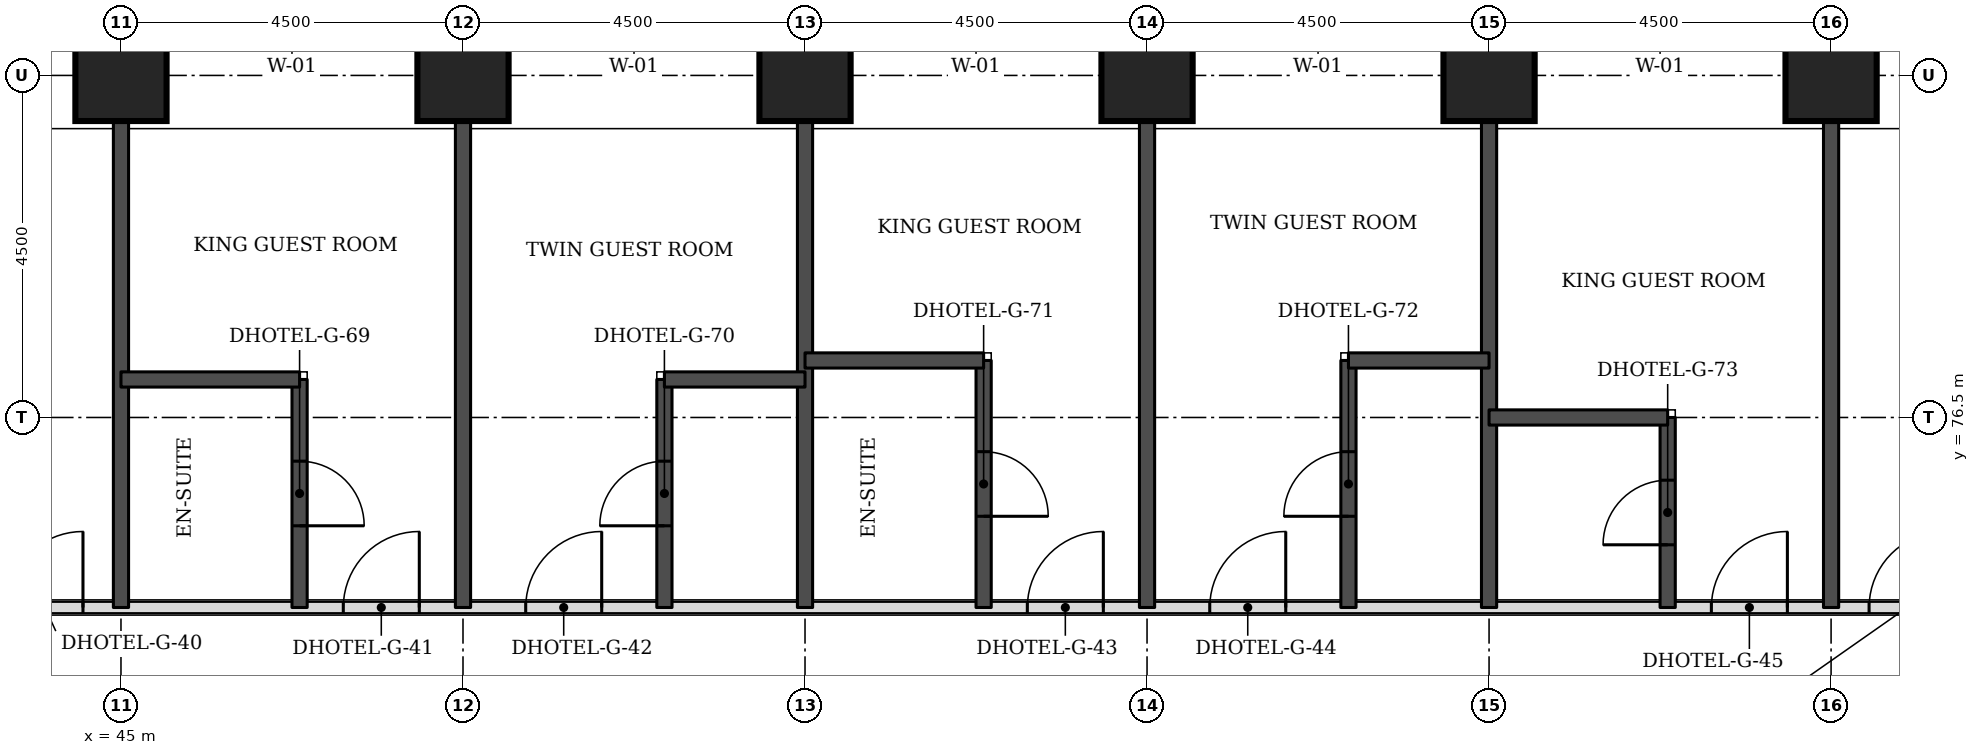
"""IFC4 building model, lengths in metres.
Left out: names, types, materials, properties, quantities, classifications, styles, units other than length and angle.
Written with IfcOpenShell. Run it as: python <this file> out.ifc"""

import sys

from ifc_helpers import new_model, si_unit, direction, frame, frame_2d, origin, origin_2d, place, context, subcontext, project, spatial, rectangle, extrude, element, fill, save


model = new_model("IFC4")
c1 = context("Model", 3, precision=1e-05, world=origin(), true_north=direction((0.0, 1.0)))
c2 = subcontext(c1, "Body", "Model", "MODEL_VIEW")
j1 = project(units=[si_unit("LENGTHUNIT", "METRE"), si_unit("PLANEANGLEUNIT", "RADIAN")], contexts=[c1])
p1 = place(None, origin())
s1 = spatial("IfcSite", under=j1, at=p1, CompositionType="ELEMENT")
p2 = place(p1, origin())
s2 = spatial("IfcBuilding", under=s1, at=p2, CompositionType="ELEMENT")
p3 = place(p2, frame((0.0, 0.0, 66.0)))
s3 = spatial("IfcBuildingStorey", under=s2, at=p3, CompositionType="ELEMENT", Elevation=66.0)
for number, where, z_axis, x_axis in (
    (1, (45.0, 81.0, 0.0), (0.0, 0.0, 1.0), (1.0, 0.0, 0.0)),
    (2, (49.5, 81.0, 0.0), (0.0, 0.0, 1.0), (1.0, 0.0, 0.0)),
    (3, (54.0, 81.0, 0.0), (0.0, 0.0, 1.0), (1.0, 0.0, 0.0)),
    (4, (58.5, 81.0, 0.0), (0.0, 0.0, 1.0), (1.0, 0.0, 0.0)),
    (5, (63.0, 81.0, 0.0), (0.0, 0.0, 1.0), (1.0, 0.0, 0.0)),
    (6, (67.5, 81.0, 0.0), (0.0, 0.0, 1.0), (1.0, 0.0, 0.0)),
):
    element("IfcColumn", number, at=place(p3, frame(where, z_axis=z_axis, x_axis=x_axis)), inside=s3, PredefinedType="COLUMN", context=c2, shape_type="SweptSolid", body=[
        extrude(rectangle(XDim=1.2, YDim=1.2, at=origin_2d()), origin(), (0.0, 0.0, 1.0), 3.3),
    ])
p4 = place(p3, frame((43.0, 74.0, 0.0), z_axis=(0.0, 0.0, 1.0), x_axis=(1.0, 0.0, 0.0)))
e7 = element("IfcWall", 7, at=p4, inside=s3, PredefinedType="PARTITIONING", context=c2, shape_type="SweptSolid", body=[
    extrude(rectangle(XDim=26.5, YDim=0.15, at=frame_2d((13.25, 0.0))), origin(), (0.0, 0.0, 1.0), 3.08),
])
p5 = place(p4, frame((4.925, 0.0, 0.0)))
e8 = element("IfcOpeningElement", 8, at=p5, cuts=e7, PredefinedType="OPENING", context=c2, shape_type="SweptSolid", body=[
    extrude(rectangle(XDim=1.0, YDim=2.1, at=frame_2d((0.5, 1.05))), frame((0.0, 0.085, 0.0), z_axis=(0.0, -1.0, 0.0), x_axis=(1.0, 0.0, 0.0)), (0.0, 0.0, 1.0), 0.17),
])
p6 = place(p4, frame((7.325, 0.0, 0.0)))
e9 = element("IfcOpeningElement", 9, at=p6, cuts=e7, PredefinedType="OPENING", context=c2, shape_type="SweptSolid", body=[
    extrude(rectangle(XDim=1.0, YDim=2.1, at=frame_2d((0.5, 1.05))), frame((0.0, 0.085, 0.0), z_axis=(0.0, -1.0, 0.0), x_axis=(1.0, 0.0, 0.0)), (0.0, 0.0, 1.0), 0.17),
])
p7 = place(p4, frame((13.925, 0.0, 0.0)))
e10 = element("IfcOpeningElement", 10, at=p7, cuts=e7, PredefinedType="OPENING", context=c2, shape_type="SweptSolid", body=[
    extrude(rectangle(XDim=1.0, YDim=2.1, at=frame_2d((0.5, 1.05))), frame((0.0, 0.085, 0.0), z_axis=(0.0, -1.0, 0.0), x_axis=(1.0, 0.0, 0.0)), (0.0, 0.0, 1.0), 0.17),
])
p8 = place(p4, frame((16.325, 0.0, 0.0)))
e11 = element("IfcOpeningElement", 11, at=p8, cuts=e7, PredefinedType="OPENING", context=c2, shape_type="SweptSolid", body=[
    extrude(rectangle(XDim=1.0, YDim=2.1, at=frame_2d((0.5, 1.05))), frame((0.0, 0.085, 0.0), z_axis=(0.0, -1.0, 0.0), x_axis=(1.0, 0.0, 0.0)), (0.0, 0.0, 1.0), 0.17),
])
p9 = place(p4, frame((22.925, 0.0, 0.0)))
e12 = element("IfcOpeningElement", 12, at=p9, cuts=e7, PredefinedType="OPENING", context=c2, shape_type="SweptSolid", body=[
    extrude(rectangle(XDim=1.0, YDim=2.1, at=frame_2d((0.5, 1.05))), frame((0.0, 0.085, 0.0), z_axis=(0.0, -1.0, 0.0), x_axis=(1.0, 0.0, 0.0)), (0.0, 0.0, 1.0), 0.17),
])
p10 = place(p4, frame((0.5, 0.0, 0.0)))
e13 = element("IfcOpeningElement", 13, at=p10, cuts=e7, PredefinedType="OPENING", context=c2, shape_type="SweptSolid", body=[
    extrude(rectangle(XDim=1.0, YDim=2.1, at=frame_2d((0.5, 1.05))), frame((0.0, 0.085, 0.0), z_axis=(0.0, -1.0, 0.0), x_axis=(1.0, 0.0, 0.0)), (0.0, 0.0, 1.0), 0.17),
])
p11 = place(p4, frame((25.0, 0.0, 0.0)))
e14 = element("IfcOpeningElement", 14, at=p11, cuts=e7, PredefinedType="OPENING", context=c2, shape_type="SweptSolid", body=[
    extrude(rectangle(XDim=1.0, YDim=2.1, at=frame_2d((0.5, 1.05))), frame((0.0, 0.085, 0.0), z_axis=(0.0, -1.0, 0.0), x_axis=(1.0, 0.0, 0.0)), (0.0, 0.0, 1.0), 0.17),
])
p12 = place(p3, frame((45.0, 74.0, 0.0), z_axis=(0.0, 0.0, 1.0), x_axis=(0.0, 1.0, 0.0)))
e15 = element("IfcWall", 15, at=p12, inside=s3, PredefinedType="SOLIDWALL", context=c2, shape_type="SweptSolid", body=[
    extrude(rectangle(XDim=6.4, YDim=0.2, at=frame_2d((3.2, 0.0))), origin(), (0.0, 0.0, 1.0), 3.08),
])
p13 = place(p3, frame((47.35, 74.0, 0.0), z_axis=(0.0, 0.0, 1.0), x_axis=(0.0, 1.0, 0.0)))
e16 = element("IfcWall", 16, at=p13, inside=s3, PredefinedType="SOLIDWALL", context=c2, shape_type="SweptSolid", body=[
    extrude(rectangle(XDim=3.0, YDim=0.2, at=frame_2d((1.5, 0.0))), origin(), (0.0, 0.0, 1.0), 3.08),
])
p14 = place(p13, frame((1.075, 0.0, 0.0)))
e17 = element("IfcOpeningElement", 17, at=p14, cuts=e16, PredefinedType="OPENING", context=c2, shape_type="SweptSolid", body=[
    extrude(rectangle(XDim=0.85, YDim=2.1, at=frame_2d((0.425, 1.05))), frame((0.0, 0.11, 0.0), z_axis=(0.0, -1.0, 0.0), x_axis=(1.0, 0.0, 0.0)), (0.0, 0.0, 1.0), 0.22),
])
p15 = place(p3, frame((49.5, 74.0, 0.0), z_axis=(0.0, 0.0, 1.0), x_axis=(0.0, 1.0, 0.0)))
e18 = element("IfcWall", 18, at=p15, inside=s3, PredefinedType="SOLIDWALL", context=c2, shape_type="SweptSolid", body=[
    extrude(rectangle(XDim=6.4, YDim=0.2, at=frame_2d((3.2, 0.0))), origin(), (0.0, 0.0, 1.0), 3.08),
])
p16 = place(p3, frame((52.15, 74.0, 0.0), z_axis=(0.0, 0.0, 1.0), x_axis=(0.0, 1.0, 0.0)))
e19 = element("IfcWall", 19, at=p16, inside=s3, PredefinedType="SOLIDWALL", context=c2, shape_type="SweptSolid", body=[
    extrude(rectangle(XDim=3.0, YDim=0.2, at=frame_2d((1.5, 0.0))), origin(), (0.0, 0.0, 1.0), 3.08),
])
p17 = place(p16, frame((1.075, 0.0, 0.0)))
e20 = element("IfcOpeningElement", 20, at=p17, cuts=e19, PredefinedType="OPENING", context=c2, shape_type="SweptSolid", body=[
    extrude(rectangle(XDim=0.85, YDim=2.1, at=frame_2d((0.425, 1.05))), frame((0.0, 0.11, 0.0), z_axis=(0.0, -1.0, 0.0), x_axis=(1.0, 0.0, 0.0)), (0.0, 0.0, 1.0), 0.22),
])
p18 = place(p3, frame((54.0, 74.0, 0.0), z_axis=(0.0, 0.0, 1.0), x_axis=(0.0, 1.0, 0.0)))
e21 = element("IfcWall", 21, at=p18, inside=s3, PredefinedType="SOLIDWALL", context=c2, shape_type="SweptSolid", body=[
    extrude(rectangle(XDim=6.4, YDim=0.2, at=frame_2d((3.2, 0.0))), origin(), (0.0, 0.0, 1.0), 3.08),
])
p19 = place(p3, frame((56.35, 74.0, 0.0), z_axis=(0.0, 0.0, 1.0), x_axis=(0.0, 1.0, 0.0)))
e22 = element("IfcWall", 22, at=p19, inside=s3, PredefinedType="SOLIDWALL", context=c2, shape_type="SweptSolid", body=[
    extrude(rectangle(XDim=3.25, YDim=0.2, at=frame_2d((1.625, 0.0))), origin(), (0.0, 0.0, 1.0), 3.08),
])
p20 = place(p19, frame((1.2, 0.0, 0.0)))
e23 = element("IfcOpeningElement", 23, at=p20, cuts=e22, PredefinedType="OPENING", context=c2, shape_type="SweptSolid", body=[
    extrude(rectangle(XDim=0.85, YDim=2.1, at=frame_2d((0.425, 1.05))), frame((0.0, 0.11, 0.0), z_axis=(0.0, -1.0, 0.0), x_axis=(1.0, 0.0, 0.0)), (0.0, 0.0, 1.0), 0.22),
])
p21 = place(p3, frame((58.5, 74.0, 0.0), z_axis=(0.0, 0.0, 1.0), x_axis=(0.0, 1.0, 0.0)))
e24 = element("IfcWall", 24, at=p21, inside=s3, PredefinedType="SOLIDWALL", context=c2, shape_type="SweptSolid", body=[
    extrude(rectangle(XDim=6.4, YDim=0.2, at=frame_2d((3.2, 0.0))), origin(), (0.0, 0.0, 1.0), 3.08),
])
p22 = place(p3, frame((61.15, 74.0, 0.0), z_axis=(0.0, 0.0, 1.0), x_axis=(0.0, 1.0, 0.0)))
e25 = element("IfcWall", 25, at=p22, inside=s3, PredefinedType="SOLIDWALL", context=c2, shape_type="SweptSolid", body=[
    extrude(rectangle(XDim=3.25, YDim=0.2, at=frame_2d((1.625, 0.0))), origin(), (0.0, 0.0, 1.0), 3.08),
])
p23 = place(p22, frame((1.2, 0.0, 0.0)))
e26 = element("IfcOpeningElement", 26, at=p23, cuts=e25, PredefinedType="OPENING", context=c2, shape_type="SweptSolid", body=[
    extrude(rectangle(XDim=0.85, YDim=2.1, at=frame_2d((0.425, 1.05))), frame((0.0, 0.11, 0.0), z_axis=(0.0, -1.0, 0.0), x_axis=(1.0, 0.0, 0.0)), (0.0, 0.0, 1.0), 0.22),
])
p24 = place(p3, frame((63.0, 74.0, 0.0), z_axis=(0.0, 0.0, 1.0), x_axis=(0.0, 1.0, 0.0)))
e27 = element("IfcWall", 27, at=p24, inside=s3, PredefinedType="SOLIDWALL", context=c2, shape_type="SweptSolid", body=[
    extrude(rectangle(XDim=6.4, YDim=0.2, at=frame_2d((3.2, 0.0))), origin(), (0.0, 0.0, 1.0), 3.08),
])
p25 = place(p3, frame((65.35, 74.0, 0.0), z_axis=(0.0, 0.0, 1.0), x_axis=(0.0, 1.0, 0.0)))
e28 = element("IfcWall", 28, at=p25, inside=s3, PredefinedType="SOLIDWALL", context=c2, shape_type="SweptSolid", body=[
    extrude(rectangle(XDim=2.5, YDim=0.2, at=frame_2d((1.25, 0.0))), origin(), (0.0, 0.0, 1.0), 3.08),
])
p26 = place(p25, frame((0.825, 0.0, 0.0)))
e29 = element("IfcOpeningElement", 29, at=p26, cuts=e28, PredefinedType="OPENING", context=c2, shape_type="SweptSolid", body=[
    extrude(rectangle(XDim=0.85, YDim=2.1, at=frame_2d((0.425, 1.05))), frame((0.0, 0.11, 0.0), z_axis=(0.0, -1.0, 0.0), x_axis=(1.0, 0.0, 0.0)), (0.0, 0.0, 1.0), 0.22),
])
p27 = place(p3, frame((67.5, 74.0, 0.0), z_axis=(0.0, 0.0, 1.0), x_axis=(0.0, 1.0, 0.0)))
e30 = element("IfcWall", 30, at=p27, inside=s3, PredefinedType="SOLIDWALL", context=c2, shape_type="SweptSolid", body=[
    extrude(rectangle(XDim=6.4, YDim=0.2, at=frame_2d((3.2, 0.0))), origin(), (0.0, 0.0, 1.0), 3.08),
])
for number, where, z_axis, x_axis in (
    (31, (63.0, 76.5, 0.0), (0.0, 0.0, 1.0), (1.0, 0.0, 0.0)),
    (32, (45.0, 77.0, 0.0), (0.0, 0.0, 1.0), (1.0, 0.0, 0.0)),
):
    element("IfcWall", number, at=place(p3, frame(where, z_axis=z_axis, x_axis=x_axis)), inside=s3, PredefinedType="SOLIDWALL", context=c2, shape_type="SweptSolid", body=[
        extrude(rectangle(XDim=2.35, YDim=0.2, at=frame_2d((1.175, 0.0))), origin(), (0.0, 0.0, 1.0), 3.08),
    ])
p28 = place(p3, frame((52.15, 77.0, 0.0), z_axis=(0.0, 0.0, 1.0), x_axis=(1.0, 0.0, 0.0)))
e33 = element("IfcWall", 33, at=p28, inside=s3, PredefinedType="SOLIDWALL", context=c2, shape_type="SweptSolid", body=[
    extrude(rectangle(XDim=1.85, YDim=0.2, at=frame_2d((0.925, 0.0))), origin(), (0.0, 0.0, 1.0), 3.08),
])
p29 = place(p3, frame((54.0, 77.25, 0.0), z_axis=(0.0, 0.0, 1.0), x_axis=(1.0, 0.0, 0.0)))
e34 = element("IfcWall", 34, at=p29, inside=s3, PredefinedType="SOLIDWALL", context=c2, shape_type="SweptSolid", body=[
    extrude(rectangle(XDim=2.35, YDim=0.2, at=frame_2d((1.175, 0.0))), origin(), (0.0, 0.0, 1.0), 3.08),
])
p30 = place(p3, frame((61.15, 77.25, 0.0), z_axis=(0.0, 0.0, 1.0), x_axis=(1.0, 0.0, 0.0)))
e35 = element("IfcWall", 35, at=p30, inside=s3, PredefinedType="SOLIDWALL", context=c2, shape_type="SweptSolid", body=[
    extrude(rectangle(XDim=1.85, YDim=0.2, at=frame_2d((0.925, 0.0))), origin(), (0.0, 0.0, 1.0), 3.08),
])
p31 = place(p5, origin())
e36 = element("IfcDoor", 36, at=p31, inside=s3, OperationType="SINGLE_SWING_RIGHT", PredefinedType="DOOR", context=c2, shape_type="SweptSolid", body=[
    extrude(rectangle(XDim=1.0, YDim=2.1, at=frame_2d((0.5, 1.05))), frame((0.0, 0.025, 0.0), z_axis=(0.0, -1.0, 0.0), x_axis=(1.0, 0.0, 0.0)), (0.0, 0.0, 1.0), 0.05),
])
fill(e8, e36)
p32 = place(p14, frame((0.85, 0.0, 0.0), z_axis=(0.0, 0.0, 1.0), x_axis=(-1.0, 0.0, 0.0)))
e37 = element("IfcDoor", 37, at=p32, inside=s3, OperationType="SINGLE_SWING_RIGHT", PredefinedType="DOOR", context=c2, shape_type="SweptSolid", body=[
    extrude(rectangle(XDim=0.85, YDim=2.1, at=frame_2d((0.425, 1.05))), frame((0.0, 0.025, 0.0), z_axis=(0.0, -1.0, 0.0), x_axis=(1.0, 0.0, 0.0)), (0.0, 0.0, 1.0), 0.05),
])
fill(e17, e37)
p33 = place(p6, origin())
e38 = element("IfcDoor", 38, at=p33, inside=s3, OperationType="SINGLE_SWING_RIGHT", PredefinedType="DOOR", context=c2, shape_type="SweptSolid", body=[
    extrude(rectangle(XDim=1.0, YDim=2.1, at=frame_2d((0.5, 1.05))), frame((0.0, 0.025, 0.0), z_axis=(0.0, -1.0, 0.0), x_axis=(1.0, 0.0, 0.0)), (0.0, 0.0, 1.0), 0.05),
])
fill(e9, e38)
p34 = place(p17, origin())
e39 = element("IfcDoor", 39, at=p34, inside=s3, OperationType="SINGLE_SWING_LEFT", PredefinedType="DOOR", context=c2, shape_type="SweptSolid", body=[
    extrude(rectangle(XDim=0.85, YDim=2.1, at=frame_2d((0.425, 1.05))), frame((0.0, 0.025, 0.0), z_axis=(0.0, -1.0, 0.0), x_axis=(1.0, 0.0, 0.0)), (0.0, 0.0, 1.0), 0.05),
])
fill(e20, e39)
p35 = place(p7, origin())
e40 = element("IfcDoor", 40, at=p35, inside=s3, OperationType="SINGLE_SWING_RIGHT", PredefinedType="DOOR", context=c2, shape_type="SweptSolid", body=[
    extrude(rectangle(XDim=1.0, YDim=2.1, at=frame_2d((0.5, 1.05))), frame((0.0, 0.025, 0.0), z_axis=(0.0, -1.0, 0.0), x_axis=(1.0, 0.0, 0.0)), (0.0, 0.0, 1.0), 0.05),
])
fill(e10, e40)
p36 = place(p20, frame((0.85, 0.0, 0.0), z_axis=(0.0, 0.0, 1.0), x_axis=(-1.0, 0.0, 0.0)))
e41 = element("IfcDoor", 41, at=p36, inside=s3, OperationType="SINGLE_SWING_RIGHT", PredefinedType="DOOR", context=c2, shape_type="SweptSolid", body=[
    extrude(rectangle(XDim=0.85, YDim=2.1, at=frame_2d((0.425, 1.05))), frame((0.0, 0.025, 0.0), z_axis=(0.0, -1.0, 0.0), x_axis=(1.0, 0.0, 0.0)), (0.0, 0.0, 1.0), 0.05),
])
fill(e23, e41)
p37 = place(p8, origin())
e42 = element("IfcDoor", 42, at=p37, inside=s3, OperationType="SINGLE_SWING_RIGHT", PredefinedType="DOOR", context=c2, shape_type="SweptSolid", body=[
    extrude(rectangle(XDim=1.0, YDim=2.1, at=frame_2d((0.5, 1.05))), frame((0.0, 0.025, 0.0), z_axis=(0.0, -1.0, 0.0), x_axis=(1.0, 0.0, 0.0)), (0.0, 0.0, 1.0), 0.05),
])
fill(e11, e42)
p38 = place(p23, origin())
e43 = element("IfcDoor", 43, at=p38, inside=s3, OperationType="SINGLE_SWING_LEFT", PredefinedType="DOOR", context=c2, shape_type="SweptSolid", body=[
    extrude(rectangle(XDim=0.85, YDim=2.1, at=frame_2d((0.425, 1.05))), frame((0.0, 0.025, 0.0), z_axis=(0.0, -1.0, 0.0), x_axis=(1.0, 0.0, 0.0)), (0.0, 0.0, 1.0), 0.05),
])
fill(e26, e43)
p39 = place(p9, origin())
e44 = element("IfcDoor", 44, at=p39, inside=s3, OperationType="SINGLE_SWING_RIGHT", PredefinedType="DOOR", context=c2, shape_type="SweptSolid", body=[
    extrude(rectangle(XDim=1.0, YDim=2.1, at=frame_2d((0.5, 1.05))), frame((0.0, 0.025, 0.0), z_axis=(0.0, -1.0, 0.0), x_axis=(1.0, 0.0, 0.0)), (0.0, 0.0, 1.0), 0.05),
])
fill(e12, e44)
p40 = place(p26, origin())
e45 = element("IfcDoor", 45, at=p40, inside=s3, OperationType="SINGLE_SWING_LEFT", PredefinedType="DOOR", context=c2, shape_type="SweptSolid", body=[
    extrude(rectangle(XDim=0.85, YDim=2.1, at=frame_2d((0.425, 1.05))), frame((0.0, 0.025, 0.0), z_axis=(0.0, -1.0, 0.0), x_axis=(1.0, 0.0, 0.0)), (0.0, 0.0, 1.0), 0.05),
])
fill(e29, e45)
p41 = place(p10, origin())
e46 = element("IfcDoor", 46, at=p41, inside=s3, OperationType="SINGLE_SWING_RIGHT", PredefinedType="DOOR", context=c2, shape_type="SweptSolid", body=[
    extrude(rectangle(XDim=1.0, YDim=2.1, at=frame_2d((0.5, 1.05))), frame((0.0, 0.025, 0.0), z_axis=(0.0, -1.0, 0.0), x_axis=(1.0, 0.0, 0.0)), (0.0, 0.0, 1.0), 0.05),
])
fill(e13, e46)
p42 = place(p11, origin())
e47 = element("IfcDoor", 47, at=p42, inside=s3, OperationType="SINGLE_SWING_RIGHT", PredefinedType="DOOR", context=c2, shape_type="SweptSolid", body=[
    extrude(rectangle(XDim=1.0, YDim=2.1, at=frame_2d((0.5, 1.05))), frame((0.0, 0.025, 0.0), z_axis=(0.0, -1.0, 0.0), x_axis=(1.0, 0.0, 0.0)), (0.0, 0.0, 1.0), 0.05),
])
fill(e14, e47)
save(model, sys.argv[1])
